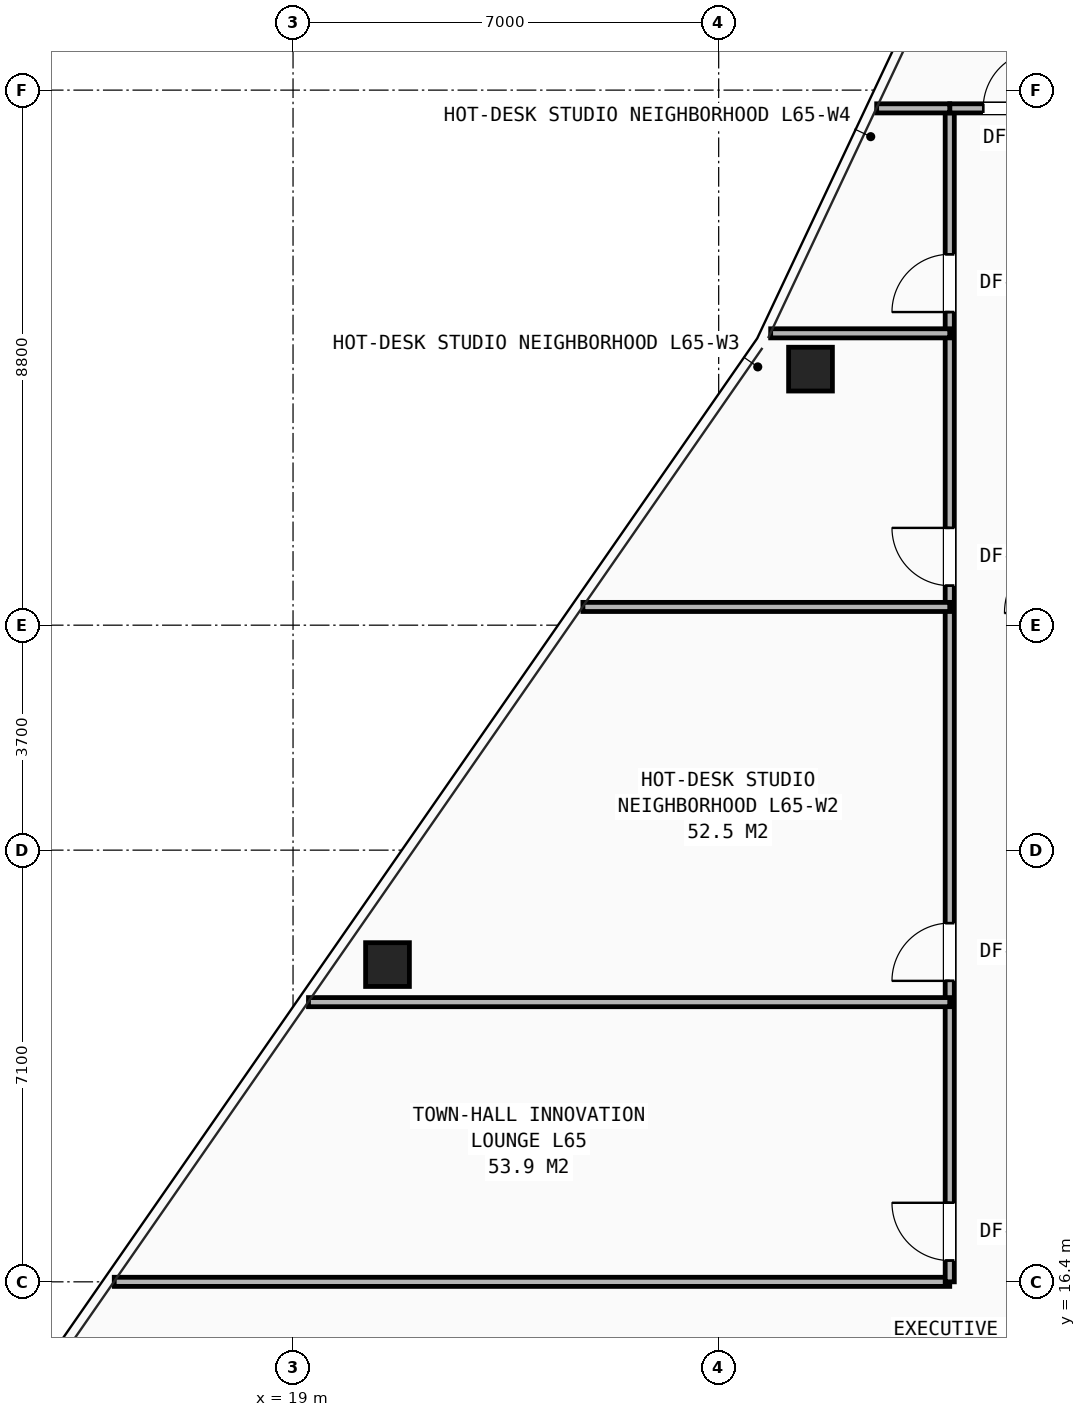
"""IFC4 building model, lengths in metres.
Left out: names, types, materials, properties, quantities, classifications, styles, units other than length and angle.
Written with IfcOpenShell. Run it as: python <this file> out.ifc"""

import sys

from ifc_helpers import new_model, si_unit, direction, frame, frame_2d, origin, origin_2d, place, context, subcontext, project, spatial, rectangle, hollow_rectangle, extrude, element, fill, save


model = new_model("IFC4")
c1 = context("Model", 3, precision=1e-05, world=origin(), true_north=direction((0.0, 1.0)))
c2 = subcontext(c1, "Body", "Model", "MODEL_VIEW")
j1 = project(units=[si_unit("LENGTHUNIT", "METRE"), si_unit("PLANEANGLEUNIT", "RADIAN")], contexts=[c1])
p1 = place(None, origin())
s1 = spatial("IfcSite", under=j1, at=p1, CompositionType="ELEMENT")
p2 = place(p1, origin())
s2 = spatial("IfcBuilding", under=s1, at=p2, CompositionType="ELEMENT")
p3 = place(p2, frame((0.0, 0.0, 229.4)))
s3 = spatial("IfcBuildingStorey", under=s2, at=p3, CompositionType="ELEMENT", Elevation=229.4)
for number, where, z_axis, x_axis in (
    (1, (27.51, 31.411, 0.0), (0.0, 0.0, 1.0), (1.0, 0.0, 0.0)),
    (2, (20.553, 21.618, 0.0), (0.0, 0.0, 1.0), (1.0, 0.0, 0.0)),
):
    element("IfcColumn", number, at=place(p3, frame(where, z_axis=z_axis, x_axis=x_axis)), inside=s3, PredefinedType="COLUMN", context=c2, shape_type="SweptSolid", body=[
        extrude(hollow_rectangle(XDim=0.72, YDim=0.72, WallThickness=0.05, at=origin_2d()), origin(), (0.0, 0.0, 1.0), 3.5),
    ])
p4 = place(p3, frame((16.06, 16.4, 0.0), z_axis=(0.0, 0.0, 1.0), x_axis=(1.0, 0.0, 0.0)))
e3 = element("IfcWall", 3, at=p4, inside=s3, PredefinedType="PARTITIONING", context=c2, shape_type="SweptSolid", body=[
    extrude(rectangle(XDim=13.74, YDim=0.15, at=frame_2d((6.87, 0.0))), origin(), (0.0, 0.0, 1.0), 2.292),
])
p5 = place(p3, frame((29.8, 16.4, 0.0), z_axis=(0.0, 0.0, 1.0), x_axis=(0.0, 1.0, 0.0)))
e4 = element("IfcWall", 4, at=p5, inside=s3, PredefinedType="PARTITIONING", context=c2, shape_type="SweptSolid", body=[
    extrude(rectangle(XDim=19.3, YDim=0.15, at=frame_2d((9.65, 0.0))), origin(), (0.0, 0.0, 1.0), 2.292),
])
p6 = place(p5, frame((0.35, 0.0, 0.0)))
e5 = element("IfcOpeningElement", 5, at=p6, cuts=e4, PredefinedType="OPENING", context=c2, shape_type="SweptSolid", body=[
    extrude(rectangle(XDim=0.95, YDim=2.1, at=frame_2d((0.475, 1.05))), frame((0.0, 0.085, 0.0), z_axis=(0.0, -1.0, 0.0), x_axis=(1.0, 0.0, 0.0)), (0.0, 0.0, 1.0), 0.17),
])
p7 = place(p5, frame((4.95, 0.0, 0.0)))
e6 = element("IfcOpeningElement", 6, at=p7, cuts=e4, PredefinedType="OPENING", context=c2, shape_type="SweptSolid", body=[
    extrude(rectangle(XDim=0.95, YDim=2.1, at=frame_2d((0.475, 1.05))), frame((0.0, 0.085, 0.0), z_axis=(0.0, -1.0, 0.0), x_axis=(1.0, 0.0, 0.0)), (0.0, 0.0, 1.0), 0.17),
])
p8 = place(p5, frame((11.45, 0.0, 0.0)))
e7 = element("IfcOpeningElement", 7, at=p8, cuts=e4, PredefinedType="OPENING", context=c2, shape_type="SweptSolid", body=[
    extrude(rectangle(XDim=0.95, YDim=2.1, at=frame_2d((0.475, 1.05))), frame((0.0, 0.085, 0.0), z_axis=(0.0, -1.0, 0.0), x_axis=(1.0, 0.0, 0.0)), (0.0, 0.0, 1.0), 0.17),
])
p9 = place(p5, frame((15.95, 0.0, 0.0)))
e8 = element("IfcOpeningElement", 8, at=p9, cuts=e4, PredefinedType="OPENING", context=c2, shape_type="SweptSolid", body=[
    extrude(rectangle(XDim=0.95, YDim=2.1, at=frame_2d((0.475, 1.05))), frame((0.0, 0.085, 0.0), z_axis=(0.0, -1.0, 0.0), x_axis=(1.0, 0.0, 0.0)), (0.0, 0.0, 1.0), 0.17),
])
p10 = place(p3, frame((29.8, 35.7, 0.0), z_axis=(0.0, 0.0, 1.0), x_axis=(1.0, 0.0, 0.0)))
e9 = element("IfcWall", 9, at=p10, inside=s3, PredefinedType="PARTITIONING", context=c2, shape_type="SweptSolid", body=[
    extrude(rectangle(XDim=9.45, YDim=0.15, at=frame_2d((4.725, 0.0))), origin(), (0.0, 0.0, 1.0), 2.628),
])
p11 = place(p10, frame((0.55, 0.0, 0.0)))
e10 = element("IfcOpeningElement", 10, at=p11, cuts=e9, PredefinedType="OPENING", context=c2, shape_type="SweptSolid", body=[
    extrude(rectangle(XDim=0.95, YDim=2.1, at=frame_2d((0.475, 1.05))), frame((0.0, 0.085, 0.0), z_axis=(0.0, -1.0, 0.0), x_axis=(1.0, 0.0, 0.0)), (0.0, 0.0, 1.0), 0.17),
])
p12 = place(p10, frame((7.05, 0.0, 0.0)))
e11 = element("IfcOpeningElement", 11, at=p12, cuts=e9, PredefinedType="OPENING", context=c2, shape_type="SweptSolid", body=[
    extrude(rectangle(XDim=0.95, YDim=2.1, at=frame_2d((0.475, 1.05))), frame((0.0, 0.085, 0.0), z_axis=(0.0, -1.0, 0.0), x_axis=(1.0, 0.0, 0.0)), (0.0, 0.0, 1.0), 0.17),
])
p13 = place(p3, frame((28.598, 35.7, 0.0), z_axis=(0.0, 0.0, 1.0), x_axis=(1.0, 0.0, 0.0)))
e12 = element("IfcWall", 12, at=p13, inside=s3, PredefinedType="PARTITIONING", context=c2, shape_type="SweptSolid", body=[
    extrude(rectangle(XDim=1.202, YDim=0.15, at=frame_2d((0.601, 0.0))), origin(), (0.0, 0.0, 1.0), 2.628),
])
p14 = place(p3, frame((19.254, 21.0, 0.0), z_axis=(0.0, 0.0, 1.0), x_axis=(1.0, 0.0, 0.0)))
e13 = element("IfcWall", 13, at=p14, inside=s3, PredefinedType="PARTITIONING", context=c2, shape_type="SweptSolid", body=[
    extrude(rectangle(XDim=10.546, YDim=0.15, at=frame_2d((5.273, 0.0))), origin(), (0.0, 0.0, 1.0), 2.292),
])
p15 = place(p3, frame((23.767, 27.5, 0.0), z_axis=(0.0, 0.0, 1.0), x_axis=(1.0, 0.0, 0.0)))
e14 = element("IfcWall", 14, at=p15, inside=s3, PredefinedType="PARTITIONING", context=c2, shape_type="SweptSolid", body=[
    extrude(rectangle(XDim=6.033, YDim=0.15, at=frame_2d((3.016, 0.0))), origin(), (0.0, 0.0, 1.0), 2.628),
])
p16 = place(p3, frame((26.855, 32.0, 0.0), z_axis=(0.0, 0.0, 1.0), x_axis=(1.0, 0.0, 0.0)))
e15 = element("IfcWall", 15, at=p16, inside=s3, PredefinedType="PARTITIONING", context=c2, shape_type="SweptSolid", body=[
    extrude(rectangle(XDim=2.945, YDim=0.15, at=frame_2d((1.473, 0.0))), origin(), (0.0, 0.0, 1.0), 2.628),
])
p17 = place(p6, origin())
e16 = element("IfcDoor", 16, at=p17, inside=s3, OperationType="SINGLE_SWING_RIGHT", PredefinedType="DOOR", context=c2, shape_type="SweptSolid", body=[
    extrude(rectangle(XDim=0.95, YDim=2.1, at=frame_2d((0.475, 1.05))), frame((0.0, 0.025, 0.0), z_axis=(0.0, -1.0, 0.0), x_axis=(1.0, 0.0, 0.0)), (0.0, 0.0, 1.0), 0.05),
])
fill(e5, e16)
p18 = place(p7, origin())
e17 = element("IfcDoor", 17, at=p18, inside=s3, OperationType="SINGLE_SWING_LEFT", PredefinedType="DOOR", context=c2, shape_type="SweptSolid", body=[
    extrude(rectangle(XDim=0.95, YDim=2.1, at=frame_2d((0.475, 1.05))), frame((0.0, 0.025, 0.0), z_axis=(0.0, -1.0, 0.0), x_axis=(1.0, 0.0, 0.0)), (0.0, 0.0, 1.0), 0.05),
])
fill(e6, e17)
p19 = place(p8, origin())
e18 = element("IfcDoor", 18, at=p19, inside=s3, OperationType="SINGLE_SWING_RIGHT", PredefinedType="DOOR", context=c2, shape_type="SweptSolid", body=[
    extrude(rectangle(XDim=0.95, YDim=2.1, at=frame_2d((0.475, 1.05))), frame((0.0, 0.025, 0.0), z_axis=(0.0, -1.0, 0.0), x_axis=(1.0, 0.0, 0.0)), (0.0, 0.0, 1.0), 0.05),
])
fill(e7, e18)
p20 = place(p9, origin())
e19 = element("IfcDoor", 19, at=p20, inside=s3, OperationType="SINGLE_SWING_LEFT", PredefinedType="DOOR", context=c2, shape_type="SweptSolid", body=[
    extrude(rectangle(XDim=0.95, YDim=2.1, at=frame_2d((0.475, 1.05))), frame((0.0, 0.025, 0.0), z_axis=(0.0, -1.0, 0.0), x_axis=(1.0, 0.0, 0.0)), (0.0, 0.0, 1.0), 0.05),
])
fill(e8, e19)
p21 = place(p11, origin())
e20 = element("IfcDoor", 20, at=p21, inside=s3, OperationType="SINGLE_SWING_RIGHT", PredefinedType="DOOR", context=c2, shape_type="SweptSolid", body=[
    extrude(rectangle(XDim=0.95, YDim=2.1, at=frame_2d((0.475, 1.05))), frame((0.0, 0.025, 0.0), z_axis=(0.0, -1.0, 0.0), x_axis=(1.0, 0.0, 0.0)), (0.0, 0.0, 1.0), 0.05),
])
fill(e10, e20)
save(model, sys.argv[1])
